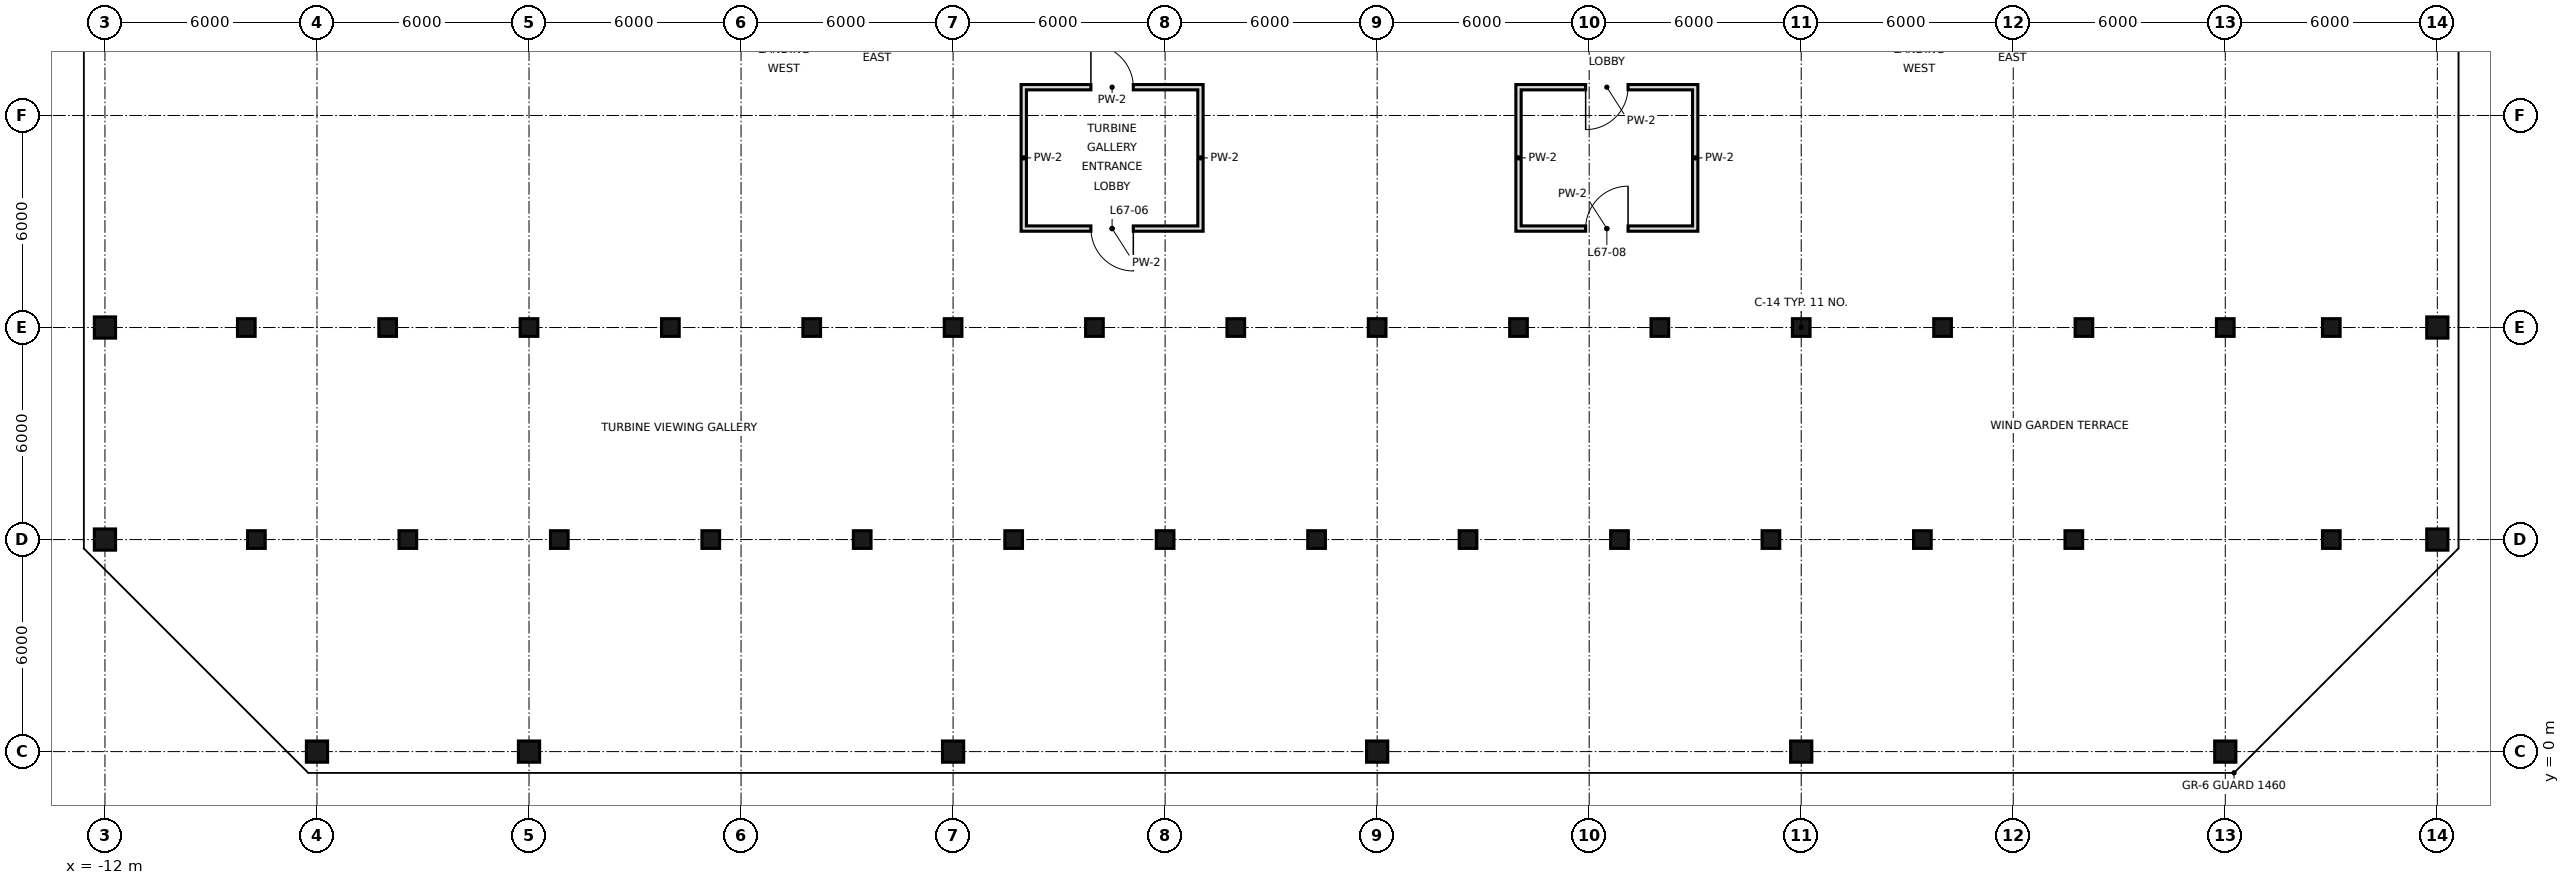
"""IFC4 building model, lengths in metres.
Left out: names, types, materials, properties, quantities, classifications, styles, units other than length and angle.
Written with IfcOpenShell. Run it as: python <this file> out.ifc"""

import sys

from ifc_helpers import new_model, si_unit, direction, frame, frame_2d, origin, origin_2d, place, context, subcontext, project, spatial, rectangle, hollow_rectangle, extrude, element, fill, save


model = new_model("IFC4")
c1 = context("Model", 3, precision=1e-05, world=origin(), true_north=direction((0.0, 1.0)))
c2 = subcontext(c1, "Body", "Model", "MODEL_VIEW")
j1 = project(units=[si_unit("LENGTHUNIT", "METRE"), si_unit("PLANEANGLEUNIT", "RADIAN")], contexts=[c1])
p1 = place(None, origin())
s1 = spatial("IfcSite", under=j1, at=p1, CompositionType="ELEMENT")
p2 = place(p1, origin())
s2 = spatial("IfcBuilding", under=s1, at=p2, CompositionType="ELEMENT")
p3 = place(p2, frame((0.0, 0.0, 281.8)))
s3 = spatial("IfcBuildingStorey", under=s2, at=p3, CompositionType="ELEMENT", Elevation=281.8)
for number, where, z_axis, x_axis in (
    (1, (-12.0, 6.0, 0.0), (0.0, 0.0, 1.0), (1.0, 0.0, 0.0)),
    (2, (-12.0, 12.0, 0.0), (0.0, 0.0, 1.0), (1.0, 0.0, 0.0)),
    (3, (-6.0, 0.0, 0.0), (0.0, 0.0, 1.0), (1.0, 0.0, 0.0)),
    (4, (0.0, 0.0, 0.0), (0.0, 0.0, 1.0), (1.0, 0.0, 0.0)),
):
    element("IfcColumn", number, at=place(p3, frame(where, z_axis=z_axis, x_axis=x_axis)), inside=s3, PredefinedType="COLUMN", context=c2, shape_type="SweptSolid", body=[
        extrude(hollow_rectangle(XDim=0.6, YDim=0.6, WallThickness=0.028, at=origin_2d()), origin(), (0.0, 0.0, 1.0), 9.0),
    ])
p4 = place(p3, frame((0.0, 12.0, 0.0), z_axis=(0.0, 0.0, 1.0), x_axis=(1.0, 0.0, 0.0)))
e5 = element("IfcColumn", 5, at=p4, inside=s3, PredefinedType="COLUMN", context=c2, shape_type="SweptSolid", body=[
    extrude(hollow_rectangle(XDim=0.5, YDim=0.5, WallThickness=0.025, at=origin_2d()), origin(), (0.0, 0.0, 1.0), 9.0),
])
p5 = place(p3, frame((12.0, 0.0, 0.0), z_axis=(0.0, 0.0, 1.0), x_axis=(1.0, 0.0, 0.0)))
e6 = element("IfcColumn", 6, at=p5, inside=s3, PredefinedType="COLUMN", context=c2, shape_type="SweptSolid", body=[
    extrude(hollow_rectangle(XDim=0.6, YDim=0.6, WallThickness=0.028, at=origin_2d()), origin(), (0.0, 0.0, 1.0), 9.0),
])
p6 = place(p3, frame((12.0, 12.0, 0.0), z_axis=(0.0, 0.0, 1.0), x_axis=(1.0, 0.0, 0.0)))
e7 = element("IfcColumn", 7, at=p6, inside=s3, PredefinedType="COLUMN", context=c2, shape_type="SweptSolid", body=[
    extrude(hollow_rectangle(XDim=0.5, YDim=0.5, WallThickness=0.025, at=origin_2d()), origin(), (0.0, 0.0, 1.0), 9.0),
])
p7 = place(p3, frame((24.0, 0.0, 0.0), z_axis=(0.0, 0.0, 1.0), x_axis=(1.0, 0.0, 0.0)))
e8 = element("IfcColumn", 8, at=p7, inside=s3, PredefinedType="COLUMN", context=c2, shape_type="SweptSolid", body=[
    extrude(hollow_rectangle(XDim=0.6, YDim=0.6, WallThickness=0.028, at=origin_2d()), origin(), (0.0, 0.0, 1.0), 9.0),
])
p8 = place(p3, frame((24.0, 12.0, 0.0), z_axis=(0.0, 0.0, 1.0), x_axis=(1.0, 0.0, 0.0)))
e9 = element("IfcColumn", 9, at=p8, inside=s3, PredefinedType="COLUMN", context=c2, shape_type="SweptSolid", body=[
    extrude(hollow_rectangle(XDim=0.5, YDim=0.5, WallThickness=0.025, at=origin_2d()), origin(), (0.0, 0.0, 1.0), 9.0),
])
p9 = place(p3, frame((36.0, 0.0, 0.0), z_axis=(0.0, 0.0, 1.0), x_axis=(1.0, 0.0, 0.0)))
e10 = element("IfcColumn", 10, at=p9, inside=s3, PredefinedType="COLUMN", context=c2, shape_type="SweptSolid", body=[
    extrude(hollow_rectangle(XDim=0.6, YDim=0.6, WallThickness=0.028, at=origin_2d()), origin(), (0.0, 0.0, 1.0), 9.0),
])
p10 = place(p3, frame((36.0, 12.0, 0.0), z_axis=(0.0, 0.0, 1.0), x_axis=(1.0, 0.0, 0.0)))
e11 = element("IfcColumn", 11, at=p10, inside=s3, PredefinedType="COLUMN", context=c2, shape_type="SweptSolid", body=[
    extrude(hollow_rectangle(XDim=0.5, YDim=0.5, WallThickness=0.025, at=origin_2d()), origin(), (0.0, 0.0, 1.0), 9.0),
])
p11 = place(p3, frame((48.0, 0.0, 0.0), z_axis=(0.0, 0.0, 1.0), x_axis=(1.0, 0.0, 0.0)))
e12 = element("IfcColumn", 12, at=p11, inside=s3, PredefinedType="COLUMN", context=c2, shape_type="SweptSolid", body=[
    extrude(hollow_rectangle(XDim=0.6, YDim=0.6, WallThickness=0.028, at=origin_2d()), origin(), (0.0, 0.0, 1.0), 9.0),
])
p12 = place(p3, frame((48.0, 12.0, 0.0), z_axis=(0.0, 0.0, 1.0), x_axis=(1.0, 0.0, 0.0)))
e13 = element("IfcColumn", 13, at=p12, inside=s3, PredefinedType="COLUMN", context=c2, shape_type="SweptSolid", body=[
    extrude(hollow_rectangle(XDim=0.5, YDim=0.5, WallThickness=0.025, at=origin_2d()), origin(), (0.0, 0.0, 1.0), 9.0),
])
for number, where, z_axis, x_axis in (
    (14, (54.0, 6.0, 0.0), (0.0, 0.0, 1.0), (1.0, 0.0, 0.0)),
    (15, (54.0, 12.0, 0.0), (0.0, 0.0, 1.0), (1.0, 0.0, 0.0)),
):
    element("IfcColumn", number, at=place(p3, frame(where, z_axis=z_axis, x_axis=x_axis)), inside=s3, PredefinedType="COLUMN", context=c2, shape_type="SweptSolid", body=[
        extrude(hollow_rectangle(XDim=0.6, YDim=0.6, WallThickness=0.028, at=origin_2d()), origin(), (0.0, 0.0, 1.0), 9.0),
    ])
for number, where, z_axis, x_axis in (
    (16, (-7.714, 6.0, 1.3), (0.0, 0.0, 1.0), (1.0, 0.0, 0.0)),
    (17, (-3.428, 6.0, 1.3), (0.0, 0.0, 1.0), (1.0, 0.0, 0.0)),
    (18, (0.857, 6.0, 1.3), (0.0, 0.0, 1.0), (1.0, 0.0, 0.0)),
    (19, (5.143, 6.0, 1.3), (0.0, 0.0, 1.0), (1.0, 0.0, 0.0)),
    (20, (9.428, 6.0, 1.3), (0.0, 0.0, 1.0), (1.0, 0.0, 0.0)),
    (21, (13.714, 6.0, 1.3), (0.0, 0.0, 1.0), (1.0, 0.0, 0.0)),
    (22, (18.0, 6.0, 1.3), (0.0, 0.0, 1.0), (1.0, 0.0, 0.0)),
    (23, (22.286, 6.0, 1.3), (0.0, 0.0, 1.0), (1.0, 0.0, 0.0)),
    (24, (26.572, 6.0, 1.3), (0.0, 0.0, 1.0), (1.0, 0.0, 0.0)),
    (25, (30.857, 6.0, 1.3), (0.0, 0.0, 1.0), (1.0, 0.0, 0.0)),
    (26, (35.143, 6.0, 1.3), (0.0, 0.0, 1.0), (1.0, 0.0, 0.0)),
    (27, (39.428, 6.0, 1.3), (0.0, 0.0, 1.0), (1.0, 0.0, 0.0)),
    (28, (43.714, 6.0, 1.3), (0.0, 0.0, 1.0), (1.0, 0.0, 0.0)),
    (29, (51.0, 6.0, 1.3), (0.0, 0.0, 1.0), (1.0, 0.0, 0.0)),
    (30, (-8.0, 12.0, 1.3), (0.0, 0.0, 1.0), (1.0, 0.0, 0.0)),
    (31, (-4.0, 12.0, 1.3), (0.0, 0.0, 1.0), (1.0, 0.0, 0.0)),
    (32, (4.0, 12.0, 1.3), (0.0, 0.0, 1.0), (1.0, 0.0, 0.0)),
    (33, (8.0, 12.0, 1.3), (0.0, 0.0, 1.0), (1.0, 0.0, 0.0)),
    (34, (16.0, 12.0, 1.3), (0.0, 0.0, 1.0), (1.0, 0.0, 0.0)),
    (35, (20.0, 12.0, 1.3), (0.0, 0.0, 1.0), (1.0, 0.0, 0.0)),
    (36, (28.0, 12.0, 1.3), (0.0, 0.0, 1.0), (1.0, 0.0, 0.0)),
    (37, (32.0, 12.0, 1.3), (0.0, 0.0, 1.0), (1.0, 0.0, 0.0)),
    (38, (40.0, 12.0, 1.3), (0.0, 0.0, 1.0), (1.0, 0.0, 0.0)),
    (39, (44.0, 12.0, 1.3), (0.0, 0.0, 1.0), (1.0, 0.0, 0.0)),
    (40, (51.0, 12.0, 1.3), (0.0, 0.0, 1.0), (1.0, 0.0, 0.0)),
):
    element("IfcColumn", number, at=place(p3, frame(where, z_axis=z_axis, x_axis=x_axis)), inside=s3, PredefinedType="COLUMN", context=c2, shape_type="SweptSolid", body=[
        extrude(hollow_rectangle(XDim=0.5, YDim=0.5, WallThickness=0.032, at=origin_2d()), origin(), (0.0, 0.0, 1.0), 6.1),
    ])
for number, where, z_axis, x_axis in (
    (41, (14.0, 14.725, 0.0), (0.0, 0.0, 1.0), (0.0, 1.0, 0.0)),
    (42, (19.0, 14.725, 0.0), (0.0, 0.0, 1.0), (0.0, 1.0, 0.0)),
    (43, (28.0, 14.725, 0.0), (0.0, 0.0, 1.0), (0.0, 1.0, 0.0)),
    (44, (33.0, 14.725, 0.0), (0.0, 0.0, 1.0), (0.0, 1.0, 0.0)),
):
    element("IfcWall", number, at=place(p3, frame(where, z_axis=z_axis, x_axis=x_axis)), inside=s3, PredefinedType="PARTITIONING", context=c2, shape_type="SweptSolid", body=[
        extrude(rectangle(XDim=4.15, YDim=0.15, at=frame_2d((2.075, 0.0))), origin(), (0.0, 0.0, 1.0), 8.7),
    ])
p13 = place(p3, frame((14.075, 14.8, 0.0), z_axis=(0.0, 0.0, 1.0), x_axis=(1.0, 0.0, 0.0)))
e45 = element("IfcWall", 45, at=p13, inside=s3, PredefinedType="PARTITIONING", context=c2, shape_type="SweptSolid", body=[
    extrude(rectangle(XDim=4.85, YDim=0.15, at=frame_2d((2.425, 0.0))), origin(), (0.0, 0.0, 1.0), 8.7),
])
p14 = place(p13, frame((1.825, 0.0, 0.0)))
e46 = element("IfcOpeningElement", 46, at=p14, cuts=e45, PredefinedType="OPENING", context=c2, shape_type="SweptSolid", body=[
    extrude(rectangle(XDim=1.2, YDim=2.4, at=frame_2d((0.6, 1.2))), frame((0.0, 0.085, 0.0), z_axis=(0.0, -1.0, 0.0), x_axis=(1.0, 0.0, 0.0)), (0.0, 0.0, 1.0), 0.17),
])
p15 = place(p3, frame((28.075, 14.8, 0.0), z_axis=(0.0, 0.0, 1.0), x_axis=(1.0, 0.0, 0.0)))
e47 = element("IfcWall", 47, at=p15, inside=s3, PredefinedType="PARTITIONING", context=c2, shape_type="SweptSolid", body=[
    extrude(rectangle(XDim=4.85, YDim=0.15, at=frame_2d((2.425, 0.0))), origin(), (0.0, 0.0, 1.0), 8.7),
])
p16 = place(p15, frame((1.825, 0.0, 0.0)))
e48 = element("IfcOpeningElement", 48, at=p16, cuts=e47, PredefinedType="OPENING", context=c2, shape_type="SweptSolid", body=[
    extrude(rectangle(XDim=1.2, YDim=2.4, at=frame_2d((0.6, 1.2))), frame((0.0, 0.085, 0.0), z_axis=(0.0, -1.0, 0.0), x_axis=(1.0, 0.0, 0.0)), (0.0, 0.0, 1.0), 0.17),
])
p17 = place(p3, frame((14.075, 18.8, 0.0), z_axis=(0.0, 0.0, 1.0), x_axis=(1.0, 0.0, 0.0)))
e49 = element("IfcWall", 49, at=p17, inside=s3, PredefinedType="PARTITIONING", context=c2, shape_type="SweptSolid", body=[
    extrude(rectangle(XDim=4.85, YDim=0.15, at=frame_2d((2.425, 0.0))), origin(), (0.0, 0.0, 1.0), 8.7),
])
p18 = place(p17, frame((1.825, 0.0, 0.0)))
e50 = element("IfcOpeningElement", 50, at=p18, cuts=e49, PredefinedType="OPENING", context=c2, shape_type="SweptSolid", body=[
    extrude(rectangle(XDim=1.2, YDim=2.4, at=frame_2d((0.6, 1.2))), frame((0.0, 0.085, 0.0), z_axis=(0.0, -1.0, 0.0), x_axis=(1.0, 0.0, 0.0)), (0.0, 0.0, 1.0), 0.17),
])
p19 = place(p3, frame((28.075, 18.8, 0.0), z_axis=(0.0, 0.0, 1.0), x_axis=(1.0, 0.0, 0.0)))
e51 = element("IfcWall", 51, at=p19, inside=s3, PredefinedType="PARTITIONING", context=c2, shape_type="SweptSolid", body=[
    extrude(rectangle(XDim=4.85, YDim=0.15, at=frame_2d((2.425, 0.0))), origin(), (0.0, 0.0, 1.0), 8.7),
])
p20 = place(p19, frame((1.825, 0.0, 0.0)))
e52 = element("IfcOpeningElement", 52, at=p20, cuts=e51, PredefinedType="OPENING", context=c2, shape_type="SweptSolid", body=[
    extrude(rectangle(XDim=1.2, YDim=2.4, at=frame_2d((0.6, 1.2))), frame((0.0, 0.085, 0.0), z_axis=(0.0, -1.0, 0.0), x_axis=(1.0, 0.0, 0.0)), (0.0, 0.0, 1.0), 0.17),
])
p21 = place(p18, origin())
e53 = element("IfcDoor", 53, at=p21, inside=s3, OperationType="SINGLE_SWING_LEFT", PredefinedType="DOOR", context=c2, shape_type="SweptSolid", body=[
    extrude(rectangle(XDim=1.2, YDim=2.4, at=frame_2d((0.6, 1.2))), frame((0.0, 0.025, 0.0), z_axis=(0.0, -1.0, 0.0), x_axis=(1.0, 0.0, 0.0)), (0.0, 0.0, 1.0), 0.05),
])
fill(e50, e53)
p22 = place(p14, origin())
e54 = element("IfcDoor", 54, at=p22, inside=s3, OperationType="SINGLE_SWING_RIGHT", PredefinedType="DOOR", context=c2, shape_type="SweptSolid", body=[
    extrude(rectangle(XDim=1.2, YDim=2.4, at=frame_2d((0.6, 1.2))), frame((0.0, 0.025, 0.0), z_axis=(0.0, -1.0, 0.0), x_axis=(1.0, 0.0, 0.0)), (0.0, 0.0, 1.0), 0.05),
])
fill(e46, e54)
p23 = place(p20, frame((1.2, 0.0, 0.0), z_axis=(0.0, 0.0, 1.0), x_axis=(-1.0, 0.0, 0.0)))
e55 = element("IfcDoor", 55, at=p23, inside=s3, OperationType="SINGLE_SWING_RIGHT", PredefinedType="DOOR", context=c2, shape_type="SweptSolid", body=[
    extrude(rectangle(XDim=1.2, YDim=2.4, at=frame_2d((0.6, 1.2))), frame((0.0, 0.025, 0.0), z_axis=(0.0, -1.0, 0.0), x_axis=(1.0, 0.0, 0.0)), (0.0, 0.0, 1.0), 0.05),
])
fill(e52, e55)
p24 = place(p16, frame((1.2, 0.0, 0.0), z_axis=(0.0, 0.0, 1.0), x_axis=(-1.0, 0.0, 0.0)))
e56 = element("IfcDoor", 56, at=p24, inside=s3, OperationType="SINGLE_SWING_LEFT", PredefinedType="DOOR", context=c2, shape_type="SweptSolid", body=[
    extrude(rectangle(XDim=1.2, YDim=2.4, at=frame_2d((0.6, 1.2))), frame((0.0, 0.025, 0.0), z_axis=(0.0, -1.0, 0.0), x_axis=(1.0, 0.0, 0.0)), (0.0, 0.0, 1.0), 0.05),
])
fill(e48, e56)
save(model, sys.argv[1])
